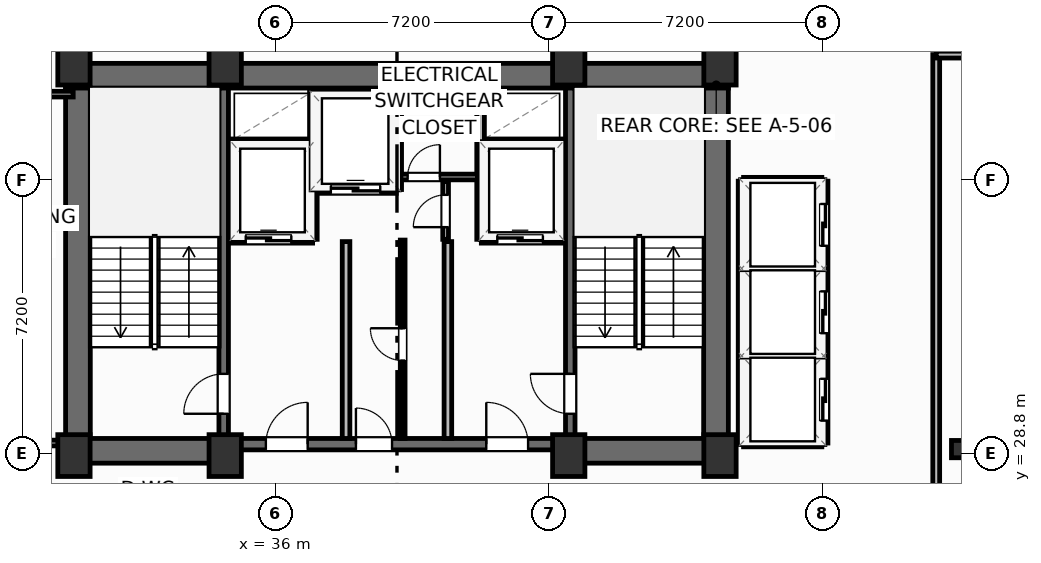
"""IFC4 building model, lengths in metres.
Left out: names, types, materials, properties, quantities, classifications, styles, units other than length and angle.
Written with IfcOpenShell. Run it as: python <this file> out.ifc"""

import sys

from ifc_helpers import new_model, si_unit, direction, frame, frame_2d, origin, origin_2d, place, context, subcontext, project, spatial, rectangle, i_section, extrude, element, fill, save


model = new_model("IFC4")
c1 = context("Model", 3, precision=1e-05, world=origin(), true_north=direction((0.0, 1.0)))
c2 = subcontext(c1, "Body", "Model", "MODEL_VIEW")
j1 = project(units=[si_unit("LENGTHUNIT", "METRE"), si_unit("PLANEANGLEUNIT", "RADIAN")], contexts=[c1])
p1 = place(None, origin())
s1 = spatial("IfcSite", under=j1, at=p1, CompositionType="ELEMENT")
p2 = place(p1, origin())
s2 = spatial("IfcBuilding", under=s1, at=p2, CompositionType="ELEMENT")
p3 = place(p2, frame((0.0, 0.0, 167.2)))
s3 = spatial("IfcBuildingStorey", under=s2, at=p3, CompositionType="ELEMENT", Elevation=167.2)
for number, where, z_axis, x_axis in (
    (1, (30.7, 28.75, 0.0), (0.0, 0.0, 1.0), (1.0, 0.0, 0.0)),
    (2, (34.68, 28.75, 0.0), (0.0, 0.0, 1.0), (1.0, 0.0, 0.0)),
    (3, (43.72, 28.75, 0.0), (0.0, 0.0, 1.0), (1.0, 0.0, 0.0)),
    (4, (47.7, 28.75, 0.0), (0.0, 0.0, 1.0), (1.0, 0.0, 0.0)),
    (5, (30.7, 39.05, 0.0), (0.0, 0.0, 1.0), (1.0, 0.0, 0.0)),
    (6, (34.68, 39.05, 0.0), (0.0, 0.0, 1.0), (1.0, 0.0, 0.0)),
    (7, (43.72, 39.05, 0.0), (0.0, 0.0, 1.0), (1.0, 0.0, 0.0)),
    (8, (47.7, 39.05, 0.0), (0.0, 0.0, 1.0), (1.0, 0.0, 0.0)),
):
    element("IfcColumn", number, at=place(p3, frame(where, z_axis=z_axis, x_axis=x_axis)), inside=s3, PredefinedType="COLUMN", context=c2, shape_type="SweptSolid", body=[
        extrude(rectangle(XDim=0.85, YDim=1.1, at=origin_2d()), origin(), (0.0, 0.0, 1.0), 3.7),
    ])
p4 = place(p3, frame((54.0, 28.92, 0.0), z_axis=(0.0, 0.0, 1.0), x_axis=(1.0, 0.0, 0.0)))
e9 = element("IfcColumn", 9, at=p4, inside=s3, PredefinedType="COLUMN", context=c2, shape_type="SweptSolid", body=[
    extrude(i_section(OverallWidth=0.418, OverallDepth=0.455, WebThickness=0.042, FlangeThickness=0.068, FilletRadius=0.025, at=origin_2d()), origin(), (0.0, 0.0, 1.0), 3.7),
])
p5 = place(p3, frame((30.48, 38.745, 0.0), z_axis=(0.0, 0.0, 1.0), x_axis=(1.0, 0.0, 0.0)))
e10 = element("IfcWall", 10, at=p5, inside=s3, PredefinedType="SHEAR", context=c2, shape_type="SweptSolid", body=[
    extrude(rectangle(XDim=17.44, YDim=0.65, at=frame_2d((8.72, 0.0))), origin(), (0.0, 0.0, 1.0), 3.45),
])
for number, where, z_axis, x_axis in (
    (11, (30.805, 29.2, 0.0), (0.0, 0.0, 1.0), (0.0, 1.0, 0.0)),
    (12, (47.595, 29.2, 0.0), (0.0, 0.0, 1.0), (0.0, 1.0, 0.0)),
):
    element("IfcWall", number, at=place(p3, frame(where, z_axis=z_axis, x_axis=x_axis)), inside=s3, PredefinedType="SHEAR", context=c2, shape_type="SweptSolid", body=[
        extrude(rectangle(XDim=9.22, YDim=0.65, at=frame_2d((4.61, 0.0))), origin(), (0.0, 0.0, 1.0), 3.45),
    ])
p6 = place(p3, frame((30.48, 28.875, 0.0), z_axis=(0.0, 0.0, 1.0), x_axis=(1.0, 0.0, 0.0)))
e13 = element("IfcWall", 13, at=p6, inside=s3, PredefinedType="SHEAR", context=c2, shape_type="SweptSolid", body=[
    extrude(rectangle(XDim=4.32, YDim=0.65, at=frame_2d((2.16, 0.0))), origin(), (0.0, 0.0, 1.0), 3.45),
])
p7 = place(p3, frame((43.6, 28.875, 0.0), z_axis=(0.0, 0.0, 1.0), x_axis=(1.0, 0.0, 0.0)))
e14 = element("IfcWall", 14, at=p7, inside=s3, PredefinedType="SHEAR", context=c2, shape_type="SweptSolid", body=[
    extrude(rectangle(XDim=4.32, YDim=0.65, at=frame_2d((2.16, 0.0))), origin(), (0.0, 0.0, 1.0), 3.45),
])
p8 = place(p3, frame((34.8, 29.05, 0.0), z_axis=(0.0, 0.0, 1.0), x_axis=(1.0, 0.0, 0.0)))
e15 = element("IfcWall", 15, at=p8, inside=s3, PredefinedType="SHEAR", context=c2, shape_type="SweptSolid", body=[
    extrude(rectangle(XDim=8.8, YDim=0.3, at=frame_2d((4.4, 0.0))), origin(), (0.0, 0.0, 1.0), 3.45),
])
p9 = place(p8, frame((0.95, 0.0, 0.0)))
e16 = element("IfcOpeningElement", 16, at=p9, cuts=e15, PredefinedType="OPENING", context=c2, shape_type="SweptSolid", body=[
    extrude(rectangle(XDim=1.1, YDim=2.15, at=frame_2d((0.55, 1.075))), frame((0.0, 0.16, 0.0), z_axis=(0.0, -1.0, 0.0), x_axis=(1.0, 0.0, 0.0)), (0.0, 0.0, 1.0), 0.32),
])
p10 = place(p8, frame((6.75, 0.0, 0.0)))
e17 = element("IfcOpeningElement", 17, at=p10, cuts=e15, PredefinedType="OPENING", context=c2, shape_type="SweptSolid", body=[
    extrude(rectangle(XDim=1.1, YDim=2.15, at=frame_2d((0.55, 1.075))), frame((0.0, 0.16, 0.0), z_axis=(0.0, -1.0, 0.0), x_axis=(1.0, 0.0, 0.0)), (0.0, 0.0, 1.0), 0.32),
])
p11 = place(p8, frame((3.32, 0.0, 0.0)))
e18 = element("IfcOpeningElement", 18, at=p11, cuts=e15, PredefinedType="OPENING", context=c2, shape_type="SweptSolid", body=[
    extrude(rectangle(XDim=0.95, YDim=2.15, at=frame_2d((0.475, 1.075))), frame((0.0, 0.16, 0.0), z_axis=(0.0, -1.0, 0.0), x_axis=(1.0, 0.0, 0.0)), (0.0, 0.0, 1.0), 0.32),
])
p12 = place(p3, frame((34.64, 29.2, 0.0), z_axis=(0.0, 0.0, 1.0), x_axis=(0.0, 1.0, 0.0)))
e19 = element("IfcWall", 19, at=p12, inside=s3, PredefinedType="SHEAR", context=c2, shape_type="SweptSolid", body=[
    extrude(rectangle(XDim=9.22, YDim=0.25, at=frame_2d((4.61, 0.0))), origin(), (0.0, 0.0, 1.0), 3.45),
])
p13 = place(p12, frame((0.65, 0.0, 0.0)))
e20 = element("IfcOpeningElement", 20, at=p13, cuts=e19, PredefinedType="OPENING", context=c2, shape_type="SweptSolid", body=[
    extrude(rectangle(XDim=1.05, YDim=2.15, at=frame_2d((0.525, 1.075))), frame((0.0, 0.135, 0.0), z_axis=(0.0, -1.0, 0.0), x_axis=(1.0, 0.0, 0.0)), (0.0, 0.0, 1.0), 0.27),
])
p14 = place(p3, frame((43.76, 29.2, 0.0), z_axis=(0.0, 0.0, 1.0), x_axis=(0.0, 1.0, 0.0)))
e21 = element("IfcWall", 21, at=p14, inside=s3, PredefinedType="SHEAR", context=c2, shape_type="SweptSolid", body=[
    extrude(rectangle(XDim=9.22, YDim=0.25, at=frame_2d((4.61, 0.0))), origin(), (0.0, 0.0, 1.0), 3.45),
])
p15 = place(p14, frame((0.65, 0.0, 0.0)))
e22 = element("IfcOpeningElement", 22, at=p15, cuts=e21, PredefinedType="OPENING", context=c2, shape_type="SweptSolid", body=[
    extrude(rectangle(XDim=1.05, YDim=2.15, at=frame_2d((0.525, 1.075))), frame((0.0, 0.135, 0.0), z_axis=(0.0, -1.0, 0.0), x_axis=(1.0, 0.0, 0.0)), (0.0, 0.0, 1.0), 0.27),
])
p16 = place(p3, frame((53.39, 19.24, 0.0), z_axis=(0.0, 0.0, 1.0), x_axis=(0.0, 1.0, 0.0)))
e23 = element("IfcWall", 23, at=p16, inside=s3, PredefinedType="PARTITIONING", context=c2, shape_type="SweptSolid", body=[
    extrude(rectangle(XDim=20.06, YDim=0.18, at=frame_2d((10.03, 0.0))), origin(), (0.0, 0.0, 1.0), 3.45),
])
p17 = place(p16, frame((7.7, 0.0, 0.0)))
e24 = element("IfcOpeningElement", 24, at=p17, cuts=e23, PredefinedType="OPENING", context=c2, shape_type="SweptSolid", body=[
    extrude(rectangle(XDim=0.95, YDim=2.05, at=frame_2d((0.475, 1.025))), frame((0.0, 0.1, 0.0), z_axis=(0.0, -1.0, 0.0), x_axis=(1.0, 0.0, 0.0)), (0.0, 0.0, 1.0), 0.2),
])
p18 = place(p3, frame((53.39, 39.3, 0.0), z_axis=(0.0, 0.0, 1.0), x_axis=(1.0, 0.0, 0.0)))
e25 = element("IfcWall", 25, at=p18, inside=s3, PredefinedType="PARTITIONING", context=c2, shape_type="SweptSolid", body=[
    extrude(rectangle(XDim=19.49, YDim=0.18, at=frame_2d((9.745, 0.0))), origin(), (0.0, 0.0, 1.0), 3.45),
])
for number, where, z_axis, x_axis in (
    (26, (37.86, 29.2, 0.0), (0.0, 0.0, 1.0), (0.0, 1.0, 0.0)),
    (27, (40.54, 29.2, 0.0), (0.0, 0.0, 1.0), (0.0, 1.0, 0.0)),
):
    element("IfcWall", number, at=place(p3, frame(where, z_axis=z_axis, x_axis=x_axis)), inside=s3, PredefinedType="PARTITIONING", context=c2, shape_type="SweptSolid", body=[
        extrude(rectangle(XDim=5.18, YDim=0.2, at=frame_2d((2.59, 0.0))), origin(), (0.0, 0.0, 1.0), 3.45),
    ])
p19 = place(p3, frame((34.8, 34.44, 0.0), z_axis=(0.0, 0.0, 1.0), x_axis=(1.0, 0.0, 0.0)))
e28 = element("IfcWall", 28, at=p19, inside=s3, PredefinedType="PARTITIONING", context=c2, shape_type="SweptSolid", body=[
    extrude(rectangle(XDim=2.18, YDim=0.2, at=frame_2d((1.09, 0.0))), origin(), (0.0, 0.0, 1.0), 3.45),
])
p20 = place(p19, frame((0.42, 0.0, 0.0)))
e29 = element("IfcOpeningElement", 29, at=p20, cuts=e28, PredefinedType="OPENING", context=c2, shape_type="SweptSolid", body=[
    extrude(rectangle(XDim=1.2, YDim=2.2, at=frame_2d((0.6, 1.1))), frame((0.0, 0.11, 0.0), z_axis=(0.0, -1.0, 0.0), x_axis=(1.0, 0.0, 0.0)), (0.0, 0.0, 1.0), 0.22),
])
p21 = place(p3, frame((34.8, 36.98, 0.0), z_axis=(0.0, 0.0, 1.0), x_axis=(1.0, 0.0, 0.0)))
e30 = element("IfcWall", 30, at=p21, inside=s3, PredefinedType="PARTITIONING", context=c2, shape_type="SweptSolid", body=[
    extrude(rectangle(XDim=2.18, YDim=0.2, at=frame_2d((1.09, 0.0))), origin(), (0.0, 0.0, 1.0), 3.45),
])
p22 = place(p3, frame((37.0, 34.44, 0.0), z_axis=(0.0, 0.0, 1.0), x_axis=(0.0, 1.0, 0.0)))
e31 = element("IfcWall", 31, at=p22, inside=s3, PredefinedType="PARTITIONING", context=c2, shape_type="SweptSolid", body=[
    extrude(rectangle(XDim=3.9, YDim=0.2, at=frame_2d((1.95, 0.0))), origin(), (0.0, 0.0, 1.0), 3.45),
])
p23 = place(p3, frame((41.42, 34.44, 0.0), z_axis=(0.0, 0.0, 1.0), x_axis=(1.0, 0.0, 0.0)))
e32 = element("IfcWall", 32, at=p23, inside=s3, PredefinedType="PARTITIONING", context=c2, shape_type="SweptSolid", body=[
    extrude(rectangle(XDim=2.18, YDim=0.2, at=frame_2d((1.09, 0.0))), origin(), (0.0, 0.0, 1.0), 3.45),
])
p24 = place(p23, frame((0.42, 0.0, 0.0)))
e33 = element("IfcOpeningElement", 33, at=p24, cuts=e32, PredefinedType="OPENING", context=c2, shape_type="SweptSolid", body=[
    extrude(rectangle(XDim=1.2, YDim=2.2, at=frame_2d((0.6, 1.1))), frame((0.0, 0.11, 0.0), z_axis=(0.0, -1.0, 0.0), x_axis=(1.0, 0.0, 0.0)), (0.0, 0.0, 1.0), 0.22),
])
p25 = place(p3, frame((41.42, 36.98, 0.0), z_axis=(0.0, 0.0, 1.0), x_axis=(1.0, 0.0, 0.0)))
e34 = element("IfcWall", 34, at=p25, inside=s3, PredefinedType="PARTITIONING", context=c2, shape_type="SweptSolid", body=[
    extrude(rectangle(XDim=2.18, YDim=0.2, at=frame_2d((1.09, 0.0))), origin(), (0.0, 0.0, 1.0), 3.45),
])
p26 = place(p3, frame((41.4, 34.44, 0.0), z_axis=(0.0, 0.0, 1.0), x_axis=(0.0, 1.0, 0.0)))
e35 = element("IfcWall", 35, at=p26, inside=s3, PredefinedType="PARTITIONING", context=c2, shape_type="SweptSolid", body=[
    extrude(rectangle(XDim=3.9, YDim=0.2, at=frame_2d((1.95, 0.0))), origin(), (0.0, 0.0, 1.0), 3.45),
])
p27 = place(p3, frame((37.06, 35.75, 0.0), z_axis=(0.0, 0.0, 1.0), x_axis=(1.0, 0.0, 0.0)))
e36 = element("IfcWall", 36, at=p27, inside=s3, PredefinedType="PARTITIONING", context=c2, shape_type="SweptSolid", body=[
    extrude(rectangle(XDim=2.12, YDim=0.2, at=frame_2d((1.06, 0.0))), origin(), (0.0, 0.0, 1.0), 3.45),
])
p28 = place(p27, frame((0.4, 0.0, 0.0)))
e37 = element("IfcOpeningElement", 37, at=p28, cuts=e36, PredefinedType="OPENING", context=c2, shape_type="SweptSolid", body=[
    extrude(rectangle(XDim=1.3, YDim=2.2, at=frame_2d((0.65, 1.1))), frame((0.0, 0.11, 0.0), z_axis=(0.0, -1.0, 0.0), x_axis=(1.0, 0.0, 0.0)), (0.0, 0.0, 1.0), 0.22),
])
p29 = place(p3, frame((39.22, 35.75, 0.0), z_axis=(0.0, 0.0, 1.0), x_axis=(0.0, 1.0, 0.0)))
e38 = element("IfcWall", 38, at=p29, inside=s3, PredefinedType="PARTITIONING", context=c2, shape_type="SweptSolid", body=[
    extrude(rectangle(XDim=2.59, YDim=0.2, at=frame_2d((1.295, 0.0))), origin(), (0.0, 0.0, 1.0), 3.45),
])
p30 = place(p3, frame((39.3, 36.08, 0.0), z_axis=(0.0, 0.0, 1.0), x_axis=(1.0, 0.0, 0.0)))
e39 = element("IfcWall", 39, at=p30, inside=s3, PredefinedType="PARTITIONING", context=c2, shape_type="SweptSolid", body=[
    extrude(rectangle(XDim=2.02, YDim=0.15, at=frame_2d((1.01, 0.0))), origin(), (0.0, 0.0, 1.0), 3.45),
])
p31 = place(p30, frame((0.18, 0.0, 0.0)))
e40 = element("IfcOpeningElement", 40, at=p31, cuts=e39, PredefinedType="OPENING", context=c2, shape_type="SweptSolid", body=[
    extrude(rectangle(XDim=0.85, YDim=2.05, at=frame_2d((0.425, 1.025))), frame((0.0, 0.085, 0.0), z_axis=(0.0, -1.0, 0.0), x_axis=(1.0, 0.0, 0.0)), (0.0, 0.0, 1.0), 0.17),
])
p32 = place(p3, frame((40.48, 34.44, 0.0), z_axis=(0.0, 0.0, 1.0), x_axis=(0.0, 1.0, 0.0)))
e41 = element("IfcWall", 41, at=p32, inside=s3, PredefinedType="PARTITIONING", context=c2, shape_type="SweptSolid", body=[
    extrude(rectangle(XDim=1.52, YDim=0.15, at=frame_2d((0.76, 0.0))), origin(), (0.0, 0.0, 1.0), 3.45),
])
p33 = place(p32, frame((0.32, 0.0, 0.0)))
e42 = element("IfcOpeningElement", 42, at=p33, cuts=e41, PredefinedType="OPENING", context=c2, shape_type="SweptSolid", body=[
    extrude(rectangle(XDim=0.85, YDim=2.05, at=frame_2d((0.425, 1.025))), frame((0.0, 0.085, 0.0), z_axis=(0.0, -1.0, 0.0), x_axis=(1.0, 0.0, 0.0)), (0.0, 0.0, 1.0), 0.17),
])
p34 = place(p3, frame((39.35, 29.2, 0.0), z_axis=(0.0, 0.0, 1.0), x_axis=(0.0, 1.0, 0.0)))
e43 = element("IfcWall", 43, at=p34, inside=s3, PredefinedType="PARTITIONING", context=c2, shape_type="SweptSolid", body=[
    extrude(rectangle(XDim=5.22, YDim=0.125, at=frame_2d((2.61, 0.0))), origin(), (0.0, 0.0, 1.0), 3.45),
])
p35 = place(p34, frame((2.05, 0.0, 0.0)))
e44 = element("IfcOpeningElement", 44, at=p35, cuts=e43, PredefinedType="OPENING", context=c2, shape_type="SweptSolid", body=[
    extrude(rectangle(XDim=0.85, YDim=2.05, at=frame_2d((0.425, 1.025))), frame((0.0, 0.073, 0.0), z_axis=(0.0, -1.0, 0.0), x_axis=(1.0, 0.0, 0.0)), (0.0, 0.0, 1.0), 0.145),
])
p36 = place(p3, frame((26.78, 29.08, 0.0), z_axis=(0.0, 0.0, 1.0), x_axis=(1.0, 0.0, 0.0)))
e45 = element("IfcWall", 45, at=p36, inside=s3, PredefinedType="PARTITIONING", context=c2, shape_type="SweptSolid", body=[
    extrude(rectangle(XDim=3.7, YDim=0.15, at=frame_2d((1.85, 0.0))), origin(), (0.0, 0.0, 1.0), 3.45),
])
p37 = place(p3, frame((26.78, 38.26, 0.0), z_axis=(0.0, 0.0, 1.0), x_axis=(1.0, 0.0, 0.0)))
e46 = element("IfcWall", 46, at=p37, inside=s3, PredefinedType="PARTITIONING", context=c2, shape_type="SweptSolid", body=[
    extrude(rectangle(XDim=3.9, YDim=0.15, at=frame_2d((1.95, 0.0))), origin(), (0.0, 0.0, 1.0), 3.45),
])
for number, where, z_axis, x_axis in (
    (47, (48.32, 31.375, 0.0), (0.0, 0.0, 1.0), (1.0, 0.0, 0.0)),
    (48, (48.32, 33.675, 0.0), (0.0, 0.0, 1.0), (1.0, 0.0, 0.0)),
):
    element("IfcWall", number, at=place(p3, frame(where, z_axis=z_axis, x_axis=x_axis)), inside=s3, PredefinedType="PARTITIONING", context=c2, shape_type="SweptSolid", body=[
        extrude(rectangle(XDim=2.06, YDim=0.2, at=frame_2d((1.03, 0.0))), origin(), (0.0, 0.0, 1.0), 3.45),
    ])
p38 = place(p3, frame((48.32, 29.08, 0.0), z_axis=(0.0, 0.0, 1.0), x_axis=(1.0, 0.0, 0.0)))
e49 = element("IfcWall", 49, at=p38, inside=s3, PredefinedType="PARTITIONING", context=c2, shape_type="SweptSolid", body=[
    extrude(rectangle(XDim=2.06, YDim=0.2, at=frame_2d((1.03, 0.0))), origin(), (0.0, 0.0, 1.0), 2.662),
])
p39 = place(p3, frame((48.32, 35.97, 0.0), z_axis=(0.0, 0.0, 1.0), x_axis=(1.0, 0.0, 0.0)))
e50 = element("IfcWall", 50, at=p39, inside=s3, PredefinedType="PARTITIONING", context=c2, shape_type="SweptSolid", body=[
    extrude(rectangle(XDim=2.06, YDim=0.2, at=frame_2d((1.03, 0.0))), origin(), (0.0, 0.0, 1.0), 3.45),
])
p40 = place(p3, frame((48.28, 29.08, 0.0), z_axis=(0.0, 0.0, 1.0), x_axis=(0.0, 1.0, 0.0)))
e51 = element("IfcWall", 51, at=p40, inside=s3, PredefinedType="PARTITIONING", context=c2, shape_type="SweptSolid", body=[
    extrude(rectangle(XDim=6.89, YDim=0.2, at=frame_2d((3.445, 0.0))), origin(), (0.0, 0.0, 1.0), 3.45),
])
p41 = place(p3, frame((50.44, 29.08, 0.0), z_axis=(0.0, 0.0, 1.0), x_axis=(0.0, 1.0, 0.0)))
e52 = element("IfcWall", 52, at=p41, inside=s3, PredefinedType="PARTITIONING", context=c2, shape_type="SweptSolid", body=[
    extrude(rectangle(XDim=6.89, YDim=0.2, at=frame_2d((3.445, 0.0))), origin(), (0.0, 0.0, 1.0), 3.45),
])
p42 = place(p41, frame((0.59, 0.0, 0.0)))
e53 = element("IfcOpeningElement", 53, at=p42, cuts=e52, PredefinedType="OPENING", context=c2, shape_type="SweptSolid", body=[
    extrude(rectangle(XDim=1.1, YDim=2.15, at=frame_2d((0.55, 1.075))), frame((0.0, 0.11, 0.0), z_axis=(0.0, -1.0, 0.0), x_axis=(1.0, 0.0, 0.0)), (0.0, 0.0, 1.0), 0.22),
])
p43 = place(p41, frame((2.89, 0.0, 0.0)))
e54 = element("IfcOpeningElement", 54, at=p43, cuts=e52, PredefinedType="OPENING", context=c2, shape_type="SweptSolid", body=[
    extrude(rectangle(XDim=1.1, YDim=2.15, at=frame_2d((0.55, 1.075))), frame((0.0, 0.11, 0.0), z_axis=(0.0, -1.0, 0.0), x_axis=(1.0, 0.0, 0.0)), (0.0, 0.0, 1.0), 0.22),
])
p44 = place(p41, frame((5.19, 0.0, 0.0)))
e55 = element("IfcOpeningElement", 55, at=p44, cuts=e52, PredefinedType="OPENING", context=c2, shape_type="SweptSolid", body=[
    extrude(rectangle(XDim=1.1, YDim=2.15, at=frame_2d((0.55, 1.075))), frame((0.0, 0.11, 0.0), z_axis=(0.0, -1.0, 0.0), x_axis=(1.0, 0.0, 0.0)), (0.0, 0.0, 1.0), 0.22),
])
p45 = place(p13, origin())
e56 = element("IfcDoor", 56, at=p45, inside=s3, OperationType="SINGLE_SWING_LEFT", PredefinedType="DOOR", context=c2, shape_type="SweptSolid", body=[
    extrude(rectangle(XDim=1.05, YDim=2.15, at=frame_2d((0.525, 1.075))), frame((0.0, 0.025, 0.0), z_axis=(0.0, -1.0, 0.0), x_axis=(1.0, 0.0, 0.0)), (0.0, 0.0, 1.0), 0.05),
])
fill(e20, e56)
p46 = place(p15, origin())
e57 = element("IfcDoor", 57, at=p46, inside=s3, OperationType="SINGLE_SWING_RIGHT", PredefinedType="DOOR", context=c2, shape_type="SweptSolid", body=[
    extrude(rectangle(XDim=1.05, YDim=2.15, at=frame_2d((0.525, 1.075))), frame((0.0, 0.025, 0.0), z_axis=(0.0, -1.0, 0.0), x_axis=(1.0, 0.0, 0.0)), (0.0, 0.0, 1.0), 0.05),
])
fill(e22, e57)
p47 = place(p9, origin())
e58 = element("IfcDoor", 58, at=p47, inside=s3, OperationType="SINGLE_SWING_RIGHT", PredefinedType="DOOR", context=c2, shape_type="SweptSolid", body=[
    extrude(rectangle(XDim=1.1, YDim=2.15, at=frame_2d((0.55, 1.075))), frame((0.0, 0.025, 0.0), z_axis=(0.0, -1.0, 0.0), x_axis=(1.0, 0.0, 0.0)), (0.0, 0.0, 1.0), 0.05),
])
fill(e16, e58)
p48 = place(p10, origin())
e59 = element("IfcDoor", 59, at=p48, inside=s3, OperationType="SINGLE_SWING_LEFT", PredefinedType="DOOR", context=c2, shape_type="SweptSolid", body=[
    extrude(rectangle(XDim=1.1, YDim=2.15, at=frame_2d((0.55, 1.075))), frame((0.0, 0.025, 0.0), z_axis=(0.0, -1.0, 0.0), x_axis=(1.0, 0.0, 0.0)), (0.0, 0.0, 1.0), 0.05),
])
fill(e17, e59)
p49 = place(p20, origin())
e60 = element("IfcDoor", 60, at=p49, inside=s3, OperationType="SLIDING_TO_LEFT", PredefinedType="DOOR", context=c2, shape_type="SweptSolid", body=[
    extrude(rectangle(XDim=1.2, YDim=2.2, at=frame_2d((0.6, 1.1))), frame((0.0, 0.025, 0.0), z_axis=(0.0, -1.0, 0.0), x_axis=(1.0, 0.0, 0.0)), (0.0, 0.0, 1.0), 0.05),
])
fill(e29, e60)
p50 = place(p24, origin())
e61 = element("IfcDoor", 61, at=p50, inside=s3, OperationType="SLIDING_TO_LEFT", PredefinedType="DOOR", context=c2, shape_type="SweptSolid", body=[
    extrude(rectangle(XDim=1.2, YDim=2.2, at=frame_2d((0.6, 1.1))), frame((0.0, 0.025, 0.0), z_axis=(0.0, -1.0, 0.0), x_axis=(1.0, 0.0, 0.0)), (0.0, 0.0, 1.0), 0.05),
])
fill(e33, e61)
p51 = place(p28, origin())
e62 = element("IfcDoor", 62, at=p51, inside=s3, OperationType="SLIDING_TO_LEFT", PredefinedType="DOOR", context=c2, shape_type="SweptSolid", body=[
    extrude(rectangle(XDim=1.3, YDim=2.2, at=frame_2d((0.65, 1.1))), frame((0.0, 0.025, 0.0), z_axis=(0.0, -1.0, 0.0), x_axis=(1.0, 0.0, 0.0)), (0.0, 0.0, 1.0), 0.05),
])
fill(e37, e62)
p52 = place(p31, origin())
e63 = element("IfcDoor", 63, at=p52, inside=s3, OperationType="SINGLE_SWING_RIGHT", PredefinedType="DOOR", context=c2, shape_type="SweptSolid", body=[
    extrude(rectangle(XDim=0.85, YDim=2.05, at=frame_2d((0.425, 1.025))), frame((0.0, 0.025, 0.0), z_axis=(0.0, -1.0, 0.0), x_axis=(1.0, 0.0, 0.0)), (0.0, 0.0, 1.0), 0.05),
])
fill(e40, e63)
p53 = place(p33, origin())
e64 = element("IfcDoor", 64, at=p53, inside=s3, OperationType="SINGLE_SWING_LEFT", PredefinedType="DOOR", context=c2, shape_type="SweptSolid", body=[
    extrude(rectangle(XDim=0.85, YDim=2.05, at=frame_2d((0.425, 1.025))), frame((0.0, 0.025, 0.0), z_axis=(0.0, -1.0, 0.0), x_axis=(1.0, 0.0, 0.0)), (0.0, 0.0, 1.0), 0.05),
])
fill(e42, e64)
p54 = place(p35, origin())
e65 = element("IfcDoor", 65, at=p54, inside=s3, OperationType="SINGLE_SWING_RIGHT", PredefinedType="DOOR", context=c2, shape_type="SweptSolid", body=[
    extrude(rectangle(XDim=0.85, YDim=2.05, at=frame_2d((0.425, 1.025))), frame((0.0, 0.025, 0.0), z_axis=(0.0, -1.0, 0.0), x_axis=(1.0, 0.0, 0.0)), (0.0, 0.0, 1.0), 0.05),
])
fill(e44, e65)
p55 = place(p11, origin())
e66 = element("IfcDoor", 66, at=p55, inside=s3, OperationType="SINGLE_SWING_LEFT", PredefinedType="DOOR", context=c2, shape_type="SweptSolid", body=[
    extrude(rectangle(XDim=0.95, YDim=2.15, at=frame_2d((0.475, 1.075))), frame((0.0, 0.025, 0.0), z_axis=(0.0, -1.0, 0.0), x_axis=(1.0, 0.0, 0.0)), (0.0, 0.0, 1.0), 0.05),
])
fill(e18, e66)
p56 = place(p42, origin())
e67 = element("IfcDoor", 67, at=p56, inside=s3, OperationType="SLIDING_TO_LEFT", PredefinedType="DOOR", context=c2, shape_type="SweptSolid", body=[
    extrude(rectangle(XDim=1.1, YDim=2.15, at=frame_2d((0.55, 1.075))), frame((0.0, 0.025, 0.0), z_axis=(0.0, -1.0, 0.0), x_axis=(1.0, 0.0, 0.0)), (0.0, 0.0, 1.0), 0.05),
])
fill(e53, e67)
p57 = place(p43, origin())
e68 = element("IfcDoor", 68, at=p57, inside=s3, OperationType="SLIDING_TO_LEFT", PredefinedType="DOOR", context=c2, shape_type="SweptSolid", body=[
    extrude(rectangle(XDim=1.1, YDim=2.15, at=frame_2d((0.55, 1.075))), frame((0.0, 0.025, 0.0), z_axis=(0.0, -1.0, 0.0), x_axis=(1.0, 0.0, 0.0)), (0.0, 0.0, 1.0), 0.05),
])
fill(e54, e68)
p58 = place(p44, origin())
e69 = element("IfcDoor", 69, at=p58, inside=s3, OperationType="SLIDING_TO_LEFT", PredefinedType="DOOR", context=c2, shape_type="SweptSolid", body=[
    extrude(rectangle(XDim=1.1, YDim=2.15, at=frame_2d((0.55, 1.075))), frame((0.0, 0.025, 0.0), z_axis=(0.0, -1.0, 0.0), x_axis=(1.0, 0.0, 0.0)), (0.0, 0.0, 1.0), 0.05),
])
fill(e55, e69)
save(model, sys.argv[1])
